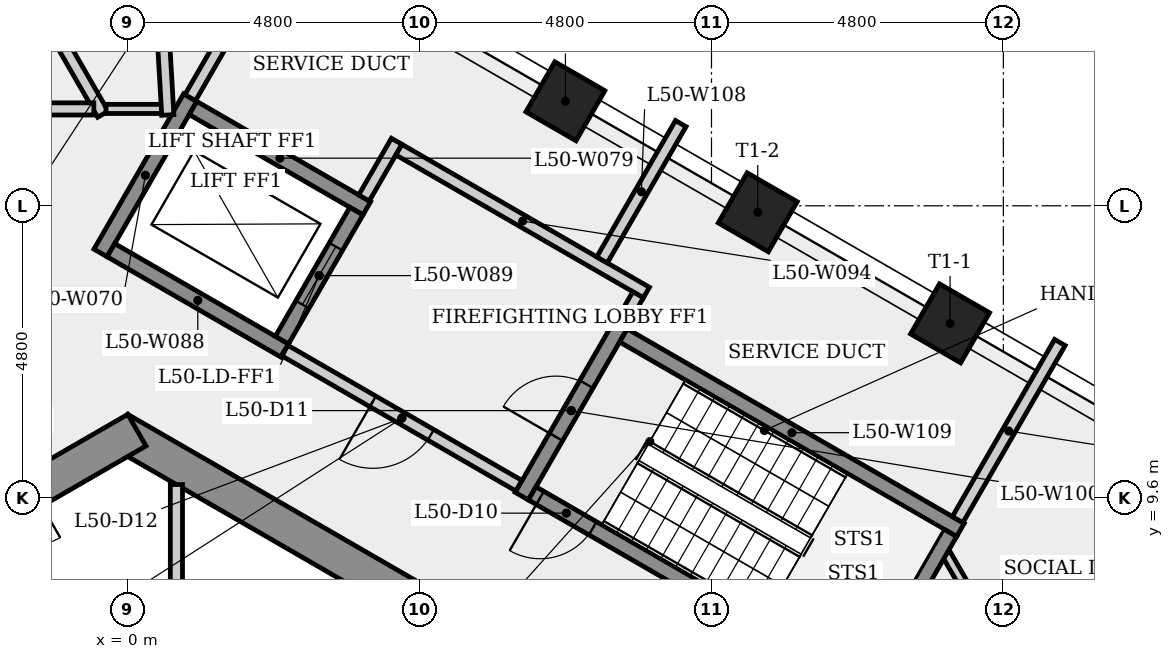
"""IFC4 building model, lengths in metres.
Left out: names, types, materials, properties, quantities, classifications, styles, units other than length and angle.
Written with IfcOpenShell. Run it as: python <this file> out.ifc"""

import sys

from ifc_helpers import new_model, si_unit, direction, frame, frame_2d, origin, origin_2d, place, context, subcontext, project, spatial, rectangle, extrude, element, fill, save


model = new_model("IFC4")
c1 = context("Model", 3, precision=1e-05, world=origin(), true_north=direction((0.0, 1.0)))
c2 = subcontext(c1, "Body", "Model", "MODEL_VIEW")
j1 = project(units=[si_unit("LENGTHUNIT", "METRE"), si_unit("PLANEANGLEUNIT", "RADIAN")], contexts=[c1])
p1 = place(None, origin())
s1 = spatial("IfcSite", under=j1, at=p1, CompositionType="ELEMENT")
p2 = place(p1, origin())
s2 = spatial("IfcBuilding", under=s1, at=p2, CompositionType="ELEMENT")
p3 = place(p2, frame((0.0, 0.0, 186.7)))
s3 = spatial("IfcBuildingStorey", under=s2, at=p3, CompositionType="ELEMENT", Elevation=186.7)
p4 = place(p3, frame((9.35, 5.225, 0.0), z_axis=(0.0, 0.0, 1.0), x_axis=(-0.866023993627, 0.500002442456, 0.0)))
e1 = element("IfcWall", 1, at=p4, inside=s3, PredefinedType="SHEAR", context=c2, shape_type="SweptSolid", body=[
    extrude(rectangle(XDim=10.97, YDim=0.6, at=frame_2d((5.485, 0.0))), origin(), (0.0, 0.0, 1.0), 4.0),
])
p5 = place(p4, frame((2.904, 0.0, 0.0)))
e2 = element("IfcOpeningElement", 2, at=p5, cuts=e1, PredefinedType="OPENING", context=c2, shape_type="SweptSolid", body=[
    extrude(rectangle(XDim=0.9, YDim=2.1, at=frame_2d((0.45, 1.05))), frame((0.0, 0.31, 0.0), z_axis=(0.0, -1.0, 0.0), x_axis=(1.0, 0.0, 0.0)), (0.0, 0.0, 1.0), 0.62),
])
p6 = place(p3, frame((0.15, 10.71, 0.0), z_axis=(0.0, 0.0, 1.0), x_axis=(-0.866023993627, -0.500002442456, 0.0)))
e3 = element("IfcWall", 3, at=p6, inside=s3, PredefinedType="SHEAR", context=c2, shape_type="SweptSolid", body=[
    extrude(rectangle(XDim=10.97, YDim=0.6, at=frame_2d((5.485, 0.0))), origin(), (0.0, 0.0, 1.0), 4.0),
])
p7 = place(p6, frame((9.182, 0.0, 0.0)))
e4 = element("IfcOpeningElement", 4, at=p7, cuts=e3, PredefinedType="OPENING", context=c2, shape_type="SweptSolid", body=[
    extrude(rectangle(XDim=0.9, YDim=2.1, at=frame_2d((0.45, 1.05))), frame((0.0, 0.31, 0.0), z_axis=(0.0, -1.0, 0.0), x_axis=(1.0, 0.0, 0.0)), (0.0, 0.0, 1.0), 0.62),
])
p8 = place(p6, frame((1.975, 0.0, 0.0)))
e5 = element("IfcOpeningElement", 5, at=p8, cuts=e3, PredefinedType="OPENING", context=c2, shape_type="SweptSolid", body=[
    extrude(rectangle(XDim=0.9, YDim=2.1, at=frame_2d((0.45, 1.05))), frame((0.0, 0.31, 0.0), z_axis=(0.0, -1.0, 0.0), x_axis=(1.0, 0.0, 0.0)), (0.0, 0.0, 1.0), 0.62),
])
for number, where, z_axis, x_axis in (
    (6, (13.523, 12.467, 0.0), (0.0, 0.0, 1.0), (0.5, 0.866, 0.0)),
    (7, (10.361, 14.293, 0.0), (0.0, 0.0, 1.0), (0.5, 0.866, 0.0)),
    (8, (7.198, 16.119, 0.0), (0.0, 0.0, 1.0), (0.5, 0.866, 0.0)),
):
    element("IfcColumn", number, at=place(p3, frame(where, z_axis=z_axis, x_axis=x_axis)), inside=s3, PredefinedType="COLUMN", context=c2, shape_type="SweptSolid", body=[
        extrude(rectangle(XDim=0.95, YDim=0.95, at=origin_2d()), origin(), (0.0, 0.0, 1.0), 4.0),
    ])
p9 = place(p3, frame((-8.712, 30.29, 0.0), z_axis=(0.0, 0.0, 1.0), x_axis=(0.500001553912, -0.866024506631, 0.0)))
e9 = element("IfcWall", 9, at=p9, inside=s3, PredefinedType="PLUMBINGWALL", context=c2, shape_type="SweptSolid", body=[
    extrude(rectangle(XDim=16.608, YDim=0.2, at=frame_2d((8.304, 0.0))), origin(), (0.0, 0.0, 1.0), 3.6),
])
p10 = place(p3, frame((-1.713, 15.993, 0.0), z_axis=(0.0, 0.0, 1.0), x_axis=(1.0, 0.0, 0.0)))
e10 = element("IfcWall", 10, at=p10, inside=s3, PredefinedType="PLUMBINGWALL", context=c2, shape_type="SweptSolid", body=[
    extrude(rectangle(XDim=1.155, YDim=0.2, at=frame_2d((0.578, 0.0))), origin(), (0.0, 0.0, 1.0), 3.6),
])
p11 = place(p3, frame((-0.358, 15.993, 0.0), z_axis=(0.0, 0.0, 1.0), x_axis=(1.0, 0.0, 0.0)))
e11 = element("IfcWall", 11, at=p11, inside=s3, PredefinedType="PARTITIONING", context=c2, shape_type="SweptSolid", body=[
    extrude(rectangle(XDim=0.911, YDim=0.15, at=frame_2d((0.456, 0.0))), origin(), (0.0, 0.0, 1.0), 3.6),
])
p12 = place(p3, frame((-0.448, 13.624, 0.0), z_axis=(0.0, 0.0, 1.0), x_axis=(0.500037662692, 0.866003658127, 0.0)))
e12 = element("IfcWall", 12, at=p12, inside=s3, PredefinedType="SHEAR", context=c2, shape_type="SweptSolid", body=[
    extrude(rectangle(XDim=2.95, YDim=0.25, at=frame_2d((1.475, 0.0))), origin(), (0.0, 0.0, 1.0), 3.6),
])
p13 = place(p3, frame((0.434, 19.763, 0.0), z_axis=(0.0, 0.0, 1.0), x_axis=(0.058013052841, -0.998315824627, 0.0)))
e13 = element("IfcWall", 13, at=p13, inside=s3, PredefinedType="PLUMBINGWALL", context=c2, shape_type="SweptSolid", body=[
    extrude(rectangle(XDim=3.876, YDim=0.2, at=frame_2d((1.938, 0.0))), origin(), (0.0, 0.0, 1.0), 3.6),
])
p14 = place(p3, frame((0.8, 9.815, 0.0), z_axis=(0.0, 0.0, 1.0), x_axis=(0.0, -1.0, 0.0)))
e14 = element("IfcWall", 14, at=p14, inside=s3, PredefinedType="PARTITIONING", context=c2, shape_type="SweptSolid", body=[
    extrude(rectangle(XDim=4.54, YDim=0.2, at=frame_2d((2.27, 0.0))), origin(), (0.0, 0.0, 1.0), 3.6),
])
p15 = place(p3, frame((1.027, 16.179, 0.0), z_axis=(0.0, 0.0, 1.0), x_axis=(0.499911014785, 0.866076773327, 0.0)))
e15 = element("IfcWall", 15, at=p15, inside=s3, PredefinedType="PLUMBINGWALL", context=c2, shape_type="SweptSolid", body=[
    extrude(rectangle(XDim=1.121, YDim=0.2, at=frame_2d((0.561, 0.0))), origin(), (0.0, 0.0, 1.0), 3.6),
])
for number, where, z_axis, x_axis in (
    (16, (1.073, 16.008, 0.0), (0.0, 0.0, 1.0), (0.866, -0.5, 0.0)),
    (17, (2.581, 12.02, 0.0), (0.0, 0.0, 1.0), (-0.866, 0.5, 0.0)),
):
    element("IfcWall", number, at=place(p3, frame(where, z_axis=z_axis, x_axis=x_axis)), inside=s3, PredefinedType="SHEAR", context=c2, shape_type="SweptSolid", body=[
        extrude(rectangle(XDim=3.3, YDim=0.25, at=frame_2d((1.65, 0.0))), origin(), (0.0, 0.0, 1.0), 3.6),
    ])
p16 = place(p3, frame((2.535, 12.191, 0.0), z_axis=(0.0, 0.0, 1.0), x_axis=(0.500061746146, 0.865989751695, 0.0)))
e18 = element("IfcWall", 18, at=p16, inside=s3, PredefinedType="SHEAR", context=c2, shape_type="SweptSolid", body=[
    extrude(rectangle(XDim=2.45, YDim=0.25, at=frame_2d((1.225, 0.0))), origin(), (0.0, 0.0, 1.0), 4.0),
])
p17 = place(p16, frame((0.675, 0.0, 0.0)))
e19 = element("IfcOpeningElement", 19, at=p17, cuts=e18, PredefinedType="OPENING", context=c2, shape_type="SweptSolid", body=[
    extrude(rectangle(XDim=1.1, YDim=2.1, at=frame_2d((0.55, 1.05))), frame((0.0, 0.135, 0.0), z_axis=(0.0, -1.0, 0.0), x_axis=(1.0, 0.0, 0.0)), (0.0, 0.0, 1.0), 0.27),
])
p18 = place(p3, frame((3.885, 14.529, 0.0), z_axis=(0.0, 0.0, 1.0), x_axis=(0.499997628298, 0.866026773083, 0.0)))
e20 = element("IfcWall", 20, at=p18, inside=s3, PredefinedType="PLUMBINGWALL", context=c2, shape_type="SweptSolid", body=[
    extrude(rectangle(XDim=1.075, YDim=0.2, at=frame_2d((0.538, 0.0))), origin(), (0.0, 0.0, 1.0), 3.6),
])
p19 = place(p3, frame((4.459, 15.323, 0.0), z_axis=(0.0, 0.0, 1.0), x_axis=(0.866016039709, -0.500016218704, 0.0)))
e21 = element("IfcWall", 21, at=p19, inside=s3, PredefinedType="PLUMBINGWALL", context=c2, shape_type="SweptSolid", body=[
    extrude(rectangle(XDim=4.7, YDim=0.2, at=frame_2d((2.35, 0.0))), origin(), (0.0, 0.0, 1.0), 3.6),
])
p20 = place(p3, frame((6.435, 9.795, 0.0), z_axis=(0.0, 0.0, 1.0), x_axis=(-0.866012907634, 0.500021643343, 0.0)))
e22 = element("IfcWall", 22, at=p20, inside=s3, PredefinedType="PARTITIONING", context=c2, shape_type="SweptSolid", body=[
    extrude(rectangle(XDim=4.45, YDim=0.2, at=frame_2d((2.225, 0.0))), origin(), (0.0, 0.0, 1.0), 3.6),
])
p21 = place(p20, frame((1.675, 0.0, 0.0)))
e23 = element("IfcOpeningElement", 23, at=p21, cuts=e22, PredefinedType="OPENING", context=c2, shape_type="SweptSolid", body=[
    extrude(rectangle(XDim=1.1, YDim=2.1, at=frame_2d((0.55, 1.05))), frame((0.0, 0.11, 0.0), z_axis=(0.0, -1.0, 0.0), x_axis=(1.0, 0.0, 0.0)), (0.0, 0.0, 1.0), 0.22),
])
p22 = place(p3, frame((6.48, 9.624, 0.0), z_axis=(0.0, 0.0, 1.0), x_axis=(0.500017246033, 0.866015446554, 0.0)))
e24 = element("IfcWall", 24, at=p22, inside=s3, PredefinedType="SHEAR", context=c2, shape_type="SweptSolid", body=[
    extrude(rectangle(XDim=3.25, YDim=0.25, at=frame_2d((1.625, 0.0))), origin(), (0.0, 0.0, 1.0), 3.6),
])
p23 = place(p22, frame((1.125, 0.0, 0.0)))
e25 = element("IfcOpeningElement", 25, at=p23, cuts=e24, PredefinedType="OPENING", context=c2, shape_type="SweptSolid", body=[
    extrude(rectangle(XDim=1.0, YDim=2.1, at=frame_2d((0.5, 1.05))), frame((0.0, 0.135, 0.0), z_axis=(0.0, -1.0, 0.0), x_axis=(1.0, 0.0, 0.0)), (0.0, 0.0, 1.0), 0.27),
])
p24 = place(p3, frame((7.8, 13.51, 0.0), z_axis=(0.0, 0.0, 1.0), x_axis=(0.499972779981, 0.866041118699, 0.0)))
e26 = element("IfcWall", 26, at=p24, inside=s3, PredefinedType="PLUMBINGWALL", context=c2, shape_type="SweptSolid", body=[
    extrude(rectangle(XDim=2.589, YDim=0.2, at=frame_2d((1.294, 0.0))), origin(), (0.0, 0.0, 1.0), 3.6),
])
p25 = place(p3, frame((8.151, 12.268, 0.0), z_axis=(0.0, 0.0, 1.0), x_axis=(0.866025499775, -0.499999833739, 0.0)))
e27 = element("IfcWall", 27, at=p25, inside=s3, PredefinedType="SHEAR", context=c2, shape_type="SweptSolid", body=[
    extrude(rectangle(XDim=6.4, YDim=0.25, at=frame_2d((3.2, 0.0))), origin(), (0.0, 0.0, 1.0), 3.6),
])
p26 = place(p3, frame((8.393, 12.937, 0.0), z_axis=(0.0, 0.0, 1.0), x_axis=(-0.500065409566, -0.86598763626, 0.0)))
e28 = element("IfcWall", 28, at=p26, inside=s3, PredefinedType="PLUMBINGWALL", context=c2, shape_type="SweptSolid", body=[
    extrude(rectangle(XDim=0.575, YDim=0.2, at=frame_2d((0.288, 0.0))), origin(), (0.0, 0.0, 1.0), 3.6),
])
p27 = place(p3, frame((12.194, 6.47, 0.0), z_axis=(0.0, 0.0, 1.0), x_axis=(-0.866025499775, 0.499999833739, 0.0)))
e29 = element("IfcWall", 29, at=p27, inside=s3, PredefinedType="SHEAR", context=c2, shape_type="SweptSolid", body=[
    extrude(rectangle(XDim=6.4, YDim=0.25, at=frame_2d((3.2, 0.0))), origin(), (0.0, 0.0, 1.0), 3.6),
])
p28 = place(p27, frame((5.25, 0.0, 0.0)))
e30 = element("IfcOpeningElement", 30, at=p28, cuts=e29, PredefinedType="OPENING", context=c2, shape_type="SweptSolid", body=[
    extrude(rectangle(XDim=1.0, YDim=2.1, at=frame_2d((0.5, 1.05))), frame((0.0, 0.135, 0.0), z_axis=(0.0, -1.0, 0.0), x_axis=(1.0, 0.0, 0.0)), (0.0, 0.0, 1.0), 0.27),
])
p29 = place(p3, frame((13.453, 8.685, 0.0), z_axis=(0.0, 0.0, 1.0), x_axis=(0.50001024923, -0.866019486308, 0.0)))
e31 = element("IfcWall", 31, at=p29, inside=s3, PredefinedType="PARTITIONING", context=c2, shape_type="SweptSolid", body=[
    extrude(rectangle(XDim=4.504, YDim=0.15, at=frame_2d((2.252, 0.0))), origin(), (0.0, 0.0, 1.0), 3.6),
])
p30 = place(p29, frame((1.697, 0.0, 0.0)))
e32 = element("IfcOpeningElement", 32, at=p30, cuts=e31, PredefinedType="OPENING", context=c2, shape_type="SweptSolid", body=[
    extrude(rectangle(XDim=1.0, YDim=2.1, at=frame_2d((0.5, 1.05))), frame((0.0, 0.085, 0.0), z_axis=(0.0, -1.0, 0.0), x_axis=(1.0, 0.0, 0.0)), (0.0, 0.0, 1.0), 0.17),
])
p31 = place(p3, frame((12.148, 6.641, 0.0), z_axis=(0.0, 0.0, 1.0), x_axis=(0.500034990121, 0.866005201286, 0.0)))
e33 = element("IfcWall", 33, at=p31, inside=s3, PredefinedType="SHEAR", context=c2, shape_type="SweptSolid", body=[
    extrude(rectangle(XDim=2.75, YDim=0.25, at=frame_2d((1.375, 0.0))), origin(), (0.0, 0.0, 1.0), 3.6),
])
p32 = place(p3, frame((15.33, 12.152, 0.0), z_axis=(0.0, 0.0, 1.0), x_axis=(-0.499971653852, -0.866041768822, 0.0)))
e34 = element("IfcWall", 34, at=p32, inside=s3, PredefinedType="PLUMBINGWALL", context=c2, shape_type="SweptSolid", body=[
    extrude(rectangle(XDim=3.364, YDim=0.2, at=frame_2d((1.682, 0.0))), origin(), (0.0, 0.0, 1.0), 3.6),
])
p33 = place(p28, origin())
e35 = element("IfcDoor", 35, at=p33, inside=s3, OperationType="SINGLE_SWING_RIGHT", PredefinedType="DOOR", context=c2, shape_type="SweptSolid", body=[
    extrude(rectangle(XDim=1.0, YDim=2.1, at=frame_2d((0.5, 1.05))), frame((0.0, 0.025, 0.0), z_axis=(0.0, -1.0, 0.0), x_axis=(1.0, 0.0, 0.0)), (0.0, 0.0, 1.0), 0.05),
])
fill(e30, e35)
p34 = place(p23, origin())
e36 = element("IfcDoor", 36, at=p34, inside=s3, OperationType="SINGLE_SWING_LEFT", PredefinedType="DOOR", context=c2, shape_type="SweptSolid", body=[
    extrude(rectangle(XDim=1.0, YDim=2.1, at=frame_2d((0.5, 1.05))), frame((0.0, 0.025, 0.0), z_axis=(0.0, -1.0, 0.0), x_axis=(1.0, 0.0, 0.0)), (0.0, 0.0, 1.0), 0.05),
])
fill(e25, e36)
p35 = place(p21, origin())
e37 = element("IfcDoor", 37, at=p35, inside=s3, OperationType="SINGLE_SWING_RIGHT", PredefinedType="DOOR", context=c2, shape_type="SweptSolid", body=[
    extrude(rectangle(XDim=1.1, YDim=2.1, at=frame_2d((0.55, 1.05))), frame((0.0, 0.025, 0.0), z_axis=(0.0, -1.0, 0.0), x_axis=(1.0, 0.0, 0.0)), (0.0, 0.0, 1.0), 0.05),
])
fill(e23, e37)
p36 = place(p17, origin())
e38 = element("IfcDoor", 38, at=p36, inside=s3, OperationType="SLIDING_TO_LEFT", PredefinedType="DOOR", context=c2, shape_type="SweptSolid", body=[
    extrude(rectangle(XDim=1.1, YDim=2.1, at=frame_2d((0.55, 1.05))), frame((0.0, 0.025, 0.0), z_axis=(0.0, -1.0, 0.0), x_axis=(1.0, 0.0, 0.0)), (0.0, 0.0, 1.0), 0.05),
])
fill(e19, e38)
save(model, sys.argv[1])
